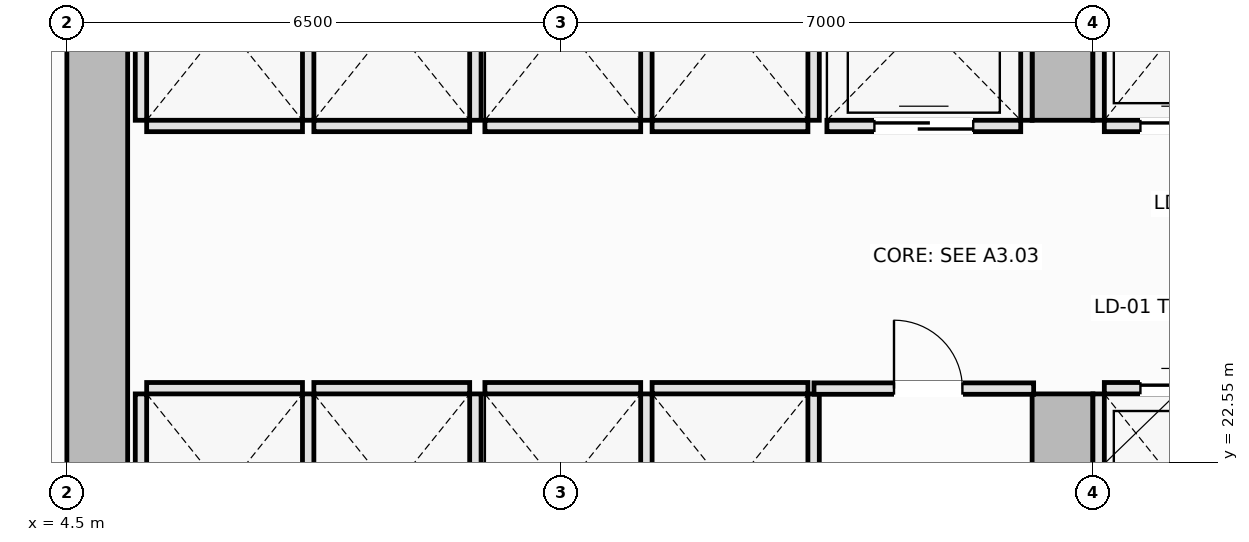
"""IFC4 building model, lengths in metres.
Left out: names, types, materials, properties, quantities, classifications, styles, units other than length and angle.
Written with IfcOpenShell. Run it as: python <this file> out.ifc"""

import sys

from ifc_helpers import new_model, si_unit, direction, frame, frame_2d, origin, place, context, subcontext, project, spatial, rectangle, extrude, element, fill, save


model = new_model("IFC4")
c1 = context("Model", 3, precision=1e-05, world=origin(), true_north=direction((0.0, 1.0)))
c2 = subcontext(c1, "Body", "Model", "MODEL_VIEW")
j1 = project(units=[si_unit("LENGTHUNIT", "METRE"), si_unit("PLANEANGLEUNIT", "RADIAN")], contexts=[c1])
p1 = place(None, origin())
s1 = spatial("IfcSite", under=j1, at=p1, CompositionType="ELEMENT")
p2 = place(p1, origin())
s2 = spatial("IfcBuilding", under=s1, at=p2, CompositionType="ELEMENT")
p3 = place(p2, frame((0.0, 0.0, 20.4)))
s3 = spatial("IfcBuildingStorey", under=s2, at=p3, CompositionType="ELEMENT", Elevation=20.4)
p4 = place(p3, frame((4.9, 14.8, 0.0), z_axis=(0.0, 0.0, 1.0), x_axis=(0.0, 1.0, 0.0)))
e1 = element("IfcWall", 1, at=p4, inside=s3, PredefinedType="SHEAR", context=c2, shape_type="SweptSolid", body=[
    extrude(rectangle(XDim=20.9, YDim=0.8, at=frame_2d((10.45, 0.0))), origin(), (0.0, 0.0, 1.0), 5.2),
])
p5 = place(p3, frame((17.6, 14.8, 0.0), z_axis=(0.0, 0.0, 1.0), x_axis=(0.0, 1.0, 0.0)))
e2 = element("IfcWall", 2, at=p5, inside=s3, PredefinedType="SHEAR", context=c2, shape_type="SweptSolid", body=[
    extrude(rectangle(XDim=8.65, YDim=0.8, at=frame_2d((4.325, 0.0))), origin(), (0.0, 0.0, 1.0), 5.2),
])
p6 = place(p5, frame((4.1, 0.0, 0.0)))
e3 = element("IfcOpeningElement", 3, at=p6, cuts=e2, PredefinedType="OPENING", context=c2, shape_type="SweptSolid", body=[
    extrude(rectangle(XDim=1.1, YDim=2.15, at=frame_2d((0.55, 1.075))), frame((0.0, 0.41, 0.0), z_axis=(0.0, -1.0, 0.0), x_axis=(1.0, 0.0, 0.0)), (0.0, 0.0, 1.0), 0.82),
])
p7 = place(p3, frame((17.6, 27.05, 0.0), z_axis=(0.0, 0.0, 1.0), x_axis=(0.0, 1.0, 0.0)))
e4 = element("IfcWall", 4, at=p7, inside=s3, PredefinedType="SHEAR", context=c2, shape_type="SweptSolid", body=[
    extrude(rectangle(XDim=8.65, YDim=0.8, at=frame_2d((4.325, 0.0))), origin(), (0.0, 0.0, 1.0), 5.2),
])
p8 = place(p7, frame((3.45, 0.0, 0.0)))
e5 = element("IfcOpeningElement", 5, at=p8, cuts=e4, PredefinedType="OPENING", context=c2, shape_type="SweptSolid", body=[
    extrude(rectangle(XDim=1.1, YDim=2.15, at=frame_2d((0.55, 1.075))), frame((0.0, 0.41, 0.0), z_axis=(0.0, -1.0, 0.0), x_axis=(1.0, 0.0, 0.0)), (0.0, 0.0, 1.0), 0.82),
])
p9 = place(p3, frame((18.15, 23.525, 0.0), z_axis=(0.0, 0.0, 1.0), x_axis=(1.0, 0.0, 0.0)))
e6 = element("IfcWall", 6, at=p9, inside=s3, PredefinedType="PARTITIONING", context=c2, shape_type="SweptSolid", body=[
    extrude(rectangle(XDim=2.05, YDim=0.15, at=frame_2d((1.025, 0.0))), origin(), (0.0, 0.0, 1.0), 5.02),
])
p10 = place(p9, frame((0.475, 0.0, 0.0)))
e7 = element("IfcOpeningElement", 7, at=p10, cuts=e6, PredefinedType="OPENING", context=c2, shape_type="SweptSolid", body=[
    extrude(rectangle(XDim=1.1, YDim=2.2, at=frame_2d((0.55, 1.1))), frame((0.0, 0.085, 0.0), z_axis=(0.0, -1.0, 0.0), x_axis=(1.0, 0.0, 0.0)), (0.0, 0.0, 1.0), 0.17),
])
p11 = place(p3, frame((18.075, 20.9, 0.0), z_axis=(0.0, 0.0, 1.0), x_axis=(0.0, 1.0, 0.0)))
e8 = element("IfcWall", 8, at=p11, inside=s3, PredefinedType="PARTITIONING", context=c2, shape_type="SweptSolid", body=[
    extrude(rectangle(XDim=2.55, YDim=0.15, at=frame_2d((1.275, 0.0))), origin(), (0.0, 0.0, 1.0), 5.02),
])
p12 = place(p3, frame((18.15, 26.975, 0.0), z_axis=(0.0, 0.0, 1.0), x_axis=(1.0, 0.0, 0.0)))
e9 = element("IfcWall", 9, at=p12, inside=s3, PredefinedType="PARTITIONING", context=c2, shape_type="SweptSolid", body=[
    extrude(rectangle(XDim=2.05, YDim=0.15, at=frame_2d((1.025, 0.0))), origin(), (0.0, 0.0, 1.0), 5.02),
])
p13 = place(p12, frame((0.475, 0.0, 0.0)))
e10 = element("IfcOpeningElement", 10, at=p13, cuts=e9, PredefinedType="OPENING", context=c2, shape_type="SweptSolid", body=[
    extrude(rectangle(XDim=1.1, YDim=2.2, at=frame_2d((0.55, 1.1))), frame((0.0, 0.085, 0.0), z_axis=(0.0, -1.0, 0.0), x_axis=(1.0, 0.0, 0.0)), (0.0, 0.0, 1.0), 0.17),
])
p14 = place(p3, frame((18.075, 27.05, 0.0), z_axis=(0.0, 0.0, 1.0), x_axis=(0.0, 1.0, 0.0)))
e11 = element("IfcWall", 11, at=p14, inside=s3, PredefinedType="PARTITIONING", context=c2, shape_type="SweptSolid", body=[
    extrude(rectangle(XDim=2.55, YDim=0.15, at=frame_2d((1.275, 0.0))), origin(), (0.0, 0.0, 1.0), 5.02),
])
p15 = place(p3, frame((5.55, 23.525, 0.0), z_axis=(0.0, 0.0, 1.0), x_axis=(1.0, 0.0, 0.0)))
e12 = element("IfcWall", 12, at=p15, inside=s3, PredefinedType="PARTITIONING", context=c2, shape_type="SweptSolid", body=[
    extrude(rectangle(XDim=2.05, YDim=0.15, at=frame_2d((1.025, 0.0))), origin(), (0.0, 0.0, 1.0), 5.02),
])
for number, where, z_axis, x_axis in (
    (13, (5.475, 20.9, 0.0), (0.0, 0.0, 1.0), (0.0, 1.0, 0.0)),
    (14, (7.675, 20.9, 0.0), (0.0, 0.0, 1.0), (0.0, 1.0, 0.0)),
):
    element("IfcWall", number, at=place(p3, frame(where, z_axis=z_axis, x_axis=x_axis)), inside=s3, PredefinedType="PARTITIONING", context=c2, shape_type="SweptSolid", body=[
        extrude(rectangle(XDim=2.55, YDim=0.15, at=frame_2d((1.275, 0.0))), origin(), (0.0, 0.0, 1.0), 5.02),
    ])
p16 = place(p3, frame((7.75, 23.525, 0.0), z_axis=(0.0, 0.0, 1.0), x_axis=(1.0, 0.0, 0.0)))
e15 = element("IfcWall", 15, at=p16, inside=s3, PredefinedType="PARTITIONING", context=c2, shape_type="SweptSolid", body=[
    extrude(rectangle(XDim=2.05, YDim=0.15, at=frame_2d((1.025, 0.0))), origin(), (0.0, 0.0, 1.0), 5.02),
])
p17 = place(p3, frame((9.875, 20.9, 0.0), z_axis=(0.0, 0.0, 1.0), x_axis=(0.0, 1.0, 0.0)))
e16 = element("IfcWall", 16, at=p17, inside=s3, PredefinedType="PARTITIONING", context=c2, shape_type="SweptSolid", body=[
    extrude(rectangle(XDim=2.55, YDim=0.15, at=frame_2d((1.275, 0.0))), origin(), (0.0, 0.0, 1.0), 5.02),
])
p18 = place(p3, frame((5.55, 26.975, 0.0), z_axis=(0.0, 0.0, 1.0), x_axis=(1.0, 0.0, 0.0)))
e17 = element("IfcWall", 17, at=p18, inside=s3, PredefinedType="PARTITIONING", context=c2, shape_type="SweptSolid", body=[
    extrude(rectangle(XDim=2.05, YDim=0.15, at=frame_2d((1.025, 0.0))), origin(), (0.0, 0.0, 1.0), 5.02),
])
for number, where, z_axis, x_axis in (
    (18, (5.475, 27.05, 0.0), (0.0, 0.0, 1.0), (0.0, 1.0, 0.0)),
    (19, (7.675, 27.05, 0.0), (0.0, 0.0, 1.0), (0.0, 1.0, 0.0)),
):
    element("IfcWall", number, at=place(p3, frame(where, z_axis=z_axis, x_axis=x_axis)), inside=s3, PredefinedType="PARTITIONING", context=c2, shape_type="SweptSolid", body=[
        extrude(rectangle(XDim=2.55, YDim=0.15, at=frame_2d((1.275, 0.0))), origin(), (0.0, 0.0, 1.0), 5.02),
    ])
p19 = place(p3, frame((7.75, 26.975, 0.0), z_axis=(0.0, 0.0, 1.0), x_axis=(1.0, 0.0, 0.0)))
e20 = element("IfcWall", 20, at=p19, inside=s3, PredefinedType="PARTITIONING", context=c2, shape_type="SweptSolid", body=[
    extrude(rectangle(XDim=2.05, YDim=0.15, at=frame_2d((1.025, 0.0))), origin(), (0.0, 0.0, 1.0), 5.02),
])
p20 = place(p3, frame((9.875, 27.05, 0.0), z_axis=(0.0, 0.0, 1.0), x_axis=(0.0, 1.0, 0.0)))
e21 = element("IfcWall", 21, at=p20, inside=s3, PredefinedType="PARTITIONING", context=c2, shape_type="SweptSolid", body=[
    extrude(rectangle(XDim=2.55, YDim=0.15, at=frame_2d((1.275, 0.0))), origin(), (0.0, 0.0, 1.0), 5.02),
])
p21 = place(p3, frame((10.0, 23.525, 0.0), z_axis=(0.0, 0.0, 1.0), x_axis=(1.0, 0.0, 0.0)))
e22 = element("IfcWall", 22, at=p21, inside=s3, PredefinedType="PARTITIONING", context=c2, shape_type="SweptSolid", body=[
    extrude(rectangle(XDim=2.05, YDim=0.15, at=frame_2d((1.025, 0.0))), origin(), (0.0, 0.0, 1.0), 5.02),
])
p22 = place(p3, frame((12.125, 20.9, 0.0), z_axis=(0.0, 0.0, 1.0), x_axis=(0.0, 1.0, 0.0)))
e23 = element("IfcWall", 23, at=p22, inside=s3, PredefinedType="PARTITIONING", context=c2, shape_type="SweptSolid", body=[
    extrude(rectangle(XDim=2.55, YDim=0.15, at=frame_2d((1.275, 0.0))), origin(), (0.0, 0.0, 1.0), 5.02),
])
p23 = place(p3, frame((12.2, 23.525, 0.0), z_axis=(0.0, 0.0, 1.0), x_axis=(1.0, 0.0, 0.0)))
e24 = element("IfcWall", 24, at=p23, inside=s3, PredefinedType="PARTITIONING", context=c2, shape_type="SweptSolid", body=[
    extrude(rectangle(XDim=2.05, YDim=0.15, at=frame_2d((1.025, 0.0))), origin(), (0.0, 0.0, 1.0), 5.02),
])
p24 = place(p3, frame((14.325, 20.9, 0.0), z_axis=(0.0, 0.0, 1.0), x_axis=(0.0, 1.0, 0.0)))
e25 = element("IfcWall", 25, at=p24, inside=s3, PredefinedType="PARTITIONING", context=c2, shape_type="SweptSolid", body=[
    extrude(rectangle(XDim=2.55, YDim=0.15, at=frame_2d((1.275, 0.0))), origin(), (0.0, 0.0, 1.0), 5.02),
])
p25 = place(p3, frame((10.0, 26.975, 0.0), z_axis=(0.0, 0.0, 1.0), x_axis=(1.0, 0.0, 0.0)))
e26 = element("IfcWall", 26, at=p25, inside=s3, PredefinedType="PARTITIONING", context=c2, shape_type="SweptSolid", body=[
    extrude(rectangle(XDim=2.05, YDim=0.15, at=frame_2d((1.025, 0.0))), origin(), (0.0, 0.0, 1.0), 5.02),
])
p26 = place(p3, frame((12.125, 27.05, 0.0), z_axis=(0.0, 0.0, 1.0), x_axis=(0.0, 1.0, 0.0)))
e27 = element("IfcWall", 27, at=p26, inside=s3, PredefinedType="PARTITIONING", context=c2, shape_type="SweptSolid", body=[
    extrude(rectangle(XDim=2.55, YDim=0.15, at=frame_2d((1.275, 0.0))), origin(), (0.0, 0.0, 1.0), 5.02),
])
p27 = place(p3, frame((12.2, 26.975, 0.0), z_axis=(0.0, 0.0, 1.0), x_axis=(1.0, 0.0, 0.0)))
e28 = element("IfcWall", 28, at=p27, inside=s3, PredefinedType="PARTITIONING", context=c2, shape_type="SweptSolid", body=[
    extrude(rectangle(XDim=2.05, YDim=0.15, at=frame_2d((1.025, 0.0))), origin(), (0.0, 0.0, 1.0), 5.02),
])
p28 = place(p3, frame((14.325, 27.05, 0.0), z_axis=(0.0, 0.0, 1.0), x_axis=(0.0, 1.0, 0.0)))
e29 = element("IfcWall", 29, at=p28, inside=s3, PredefinedType="PARTITIONING", context=c2, shape_type="SweptSolid", body=[
    extrude(rectangle(XDim=2.55, YDim=0.15, at=frame_2d((1.275, 0.0))), origin(), (0.0, 0.0, 1.0), 5.02),
])
p29 = place(p3, frame((14.5, 26.975, 0.0), z_axis=(0.0, 0.0, 1.0), x_axis=(1.0, 0.0, 0.0)))
e30 = element("IfcWall", 30, at=p29, inside=s3, PredefinedType="PARTITIONING", context=c2, shape_type="SweptSolid", body=[
    extrude(rectangle(XDim=2.55, YDim=0.15, at=frame_2d((1.275, 0.0))), origin(), (0.0, 0.0, 1.0), 5.02),
])
p30 = place(p29, frame((0.625, 0.0, 0.0)))
e31 = element("IfcOpeningElement", 31, at=p30, cuts=e30, PredefinedType="OPENING", context=c2, shape_type="SweptSolid", body=[
    extrude(rectangle(XDim=1.3, YDim=2.2, at=frame_2d((0.65, 1.1))), frame((0.0, 0.085, 0.0), z_axis=(0.0, -1.0, 0.0), x_axis=(1.0, 0.0, 0.0)), (0.0, 0.0, 1.0), 0.17),
])
p31 = place(p3, frame((17.125, 27.05, 0.0), z_axis=(0.0, 0.0, 1.0), x_axis=(0.0, 1.0, 0.0)))
e32 = element("IfcWall", 32, at=p31, inside=s3, PredefinedType="PARTITIONING", context=c2, shape_type="SweptSolid", body=[
    extrude(rectangle(XDim=2.6, YDim=0.15, at=frame_2d((1.3, 0.0))), origin(), (0.0, 0.0, 1.0), 5.02),
])
p32 = place(p3, frame((14.33, 23.52, 0.0), z_axis=(0.0, 0.0, 1.0), x_axis=(1.0, 0.0, 0.0)))
e33 = element("IfcWall", 33, at=p32, inside=s3, PredefinedType="PARTITIONING", context=c2, shape_type="SweptSolid", body=[
    extrude(rectangle(XDim=2.89, YDim=0.15, at=frame_2d((1.445, 0.0))), origin(), (0.0, 0.0, 1.0), 5.02),
])
p33 = place(p32, frame((1.053, 0.0, 0.0)))
e34 = element("IfcOpeningElement", 34, at=p33, cuts=e33, PredefinedType="OPENING", context=c2, shape_type="SweptSolid", body=[
    extrude(rectangle(XDim=0.9, YDim=2.1, at=frame_2d((0.45, 1.05))), frame((0.0, 0.085, 0.0), z_axis=(0.0, -1.0, 0.0), x_axis=(1.0, 0.0, 0.0)), (0.0, 0.0, 1.0), 0.17),
])
p34 = place(p10, origin())
e35 = element("IfcDoor", 35, at=p34, inside=s3, OperationType="DOUBLE_DOOR_SLIDING", PredefinedType="DOOR", context=c2, shape_type="SweptSolid", body=[
    extrude(rectangle(XDim=1.1, YDim=2.2, at=frame_2d((0.55, 1.1))), frame((0.0, 0.025, 0.0), z_axis=(0.0, -1.0, 0.0), x_axis=(1.0, 0.0, 0.0)), (0.0, 0.0, 1.0), 0.05),
])
fill(e7, e35)
p35 = place(p13, origin())
e36 = element("IfcDoor", 36, at=p35, inside=s3, OperationType="DOUBLE_DOOR_SLIDING", PredefinedType="DOOR", context=c2, shape_type="SweptSolid", body=[
    extrude(rectangle(XDim=1.1, YDim=2.2, at=frame_2d((0.55, 1.1))), frame((0.0, 0.025, 0.0), z_axis=(0.0, -1.0, 0.0), x_axis=(1.0, 0.0, 0.0)), (0.0, 0.0, 1.0), 0.05),
])
fill(e10, e36)
p36 = place(p30, origin())
e37 = element("IfcDoor", 37, at=p36, inside=s3, OperationType="DOUBLE_DOOR_SLIDING", PredefinedType="DOOR", context=c2, shape_type="SweptSolid", body=[
    extrude(rectangle(XDim=1.3, YDim=2.2, at=frame_2d((0.65, 1.1))), frame((0.0, 0.025, 0.0), z_axis=(0.0, -1.0, 0.0), x_axis=(1.0, 0.0, 0.0)), (0.0, 0.0, 1.0), 0.05),
])
fill(e31, e37)
p37 = place(p33, origin())
e38 = element("IfcDoor", 38, at=p37, inside=s3, OperationType="SINGLE_SWING_LEFT", PredefinedType="DOOR", context=c2, shape_type="SweptSolid", body=[
    extrude(rectangle(XDim=0.9, YDim=2.1, at=frame_2d((0.45, 1.05))), frame((0.0, 0.025, 0.0), z_axis=(0.0, -1.0, 0.0), x_axis=(1.0, 0.0, 0.0)), (0.0, 0.0, 1.0), 0.05),
])
fill(e34, e38)
save(model, sys.argv[1])
